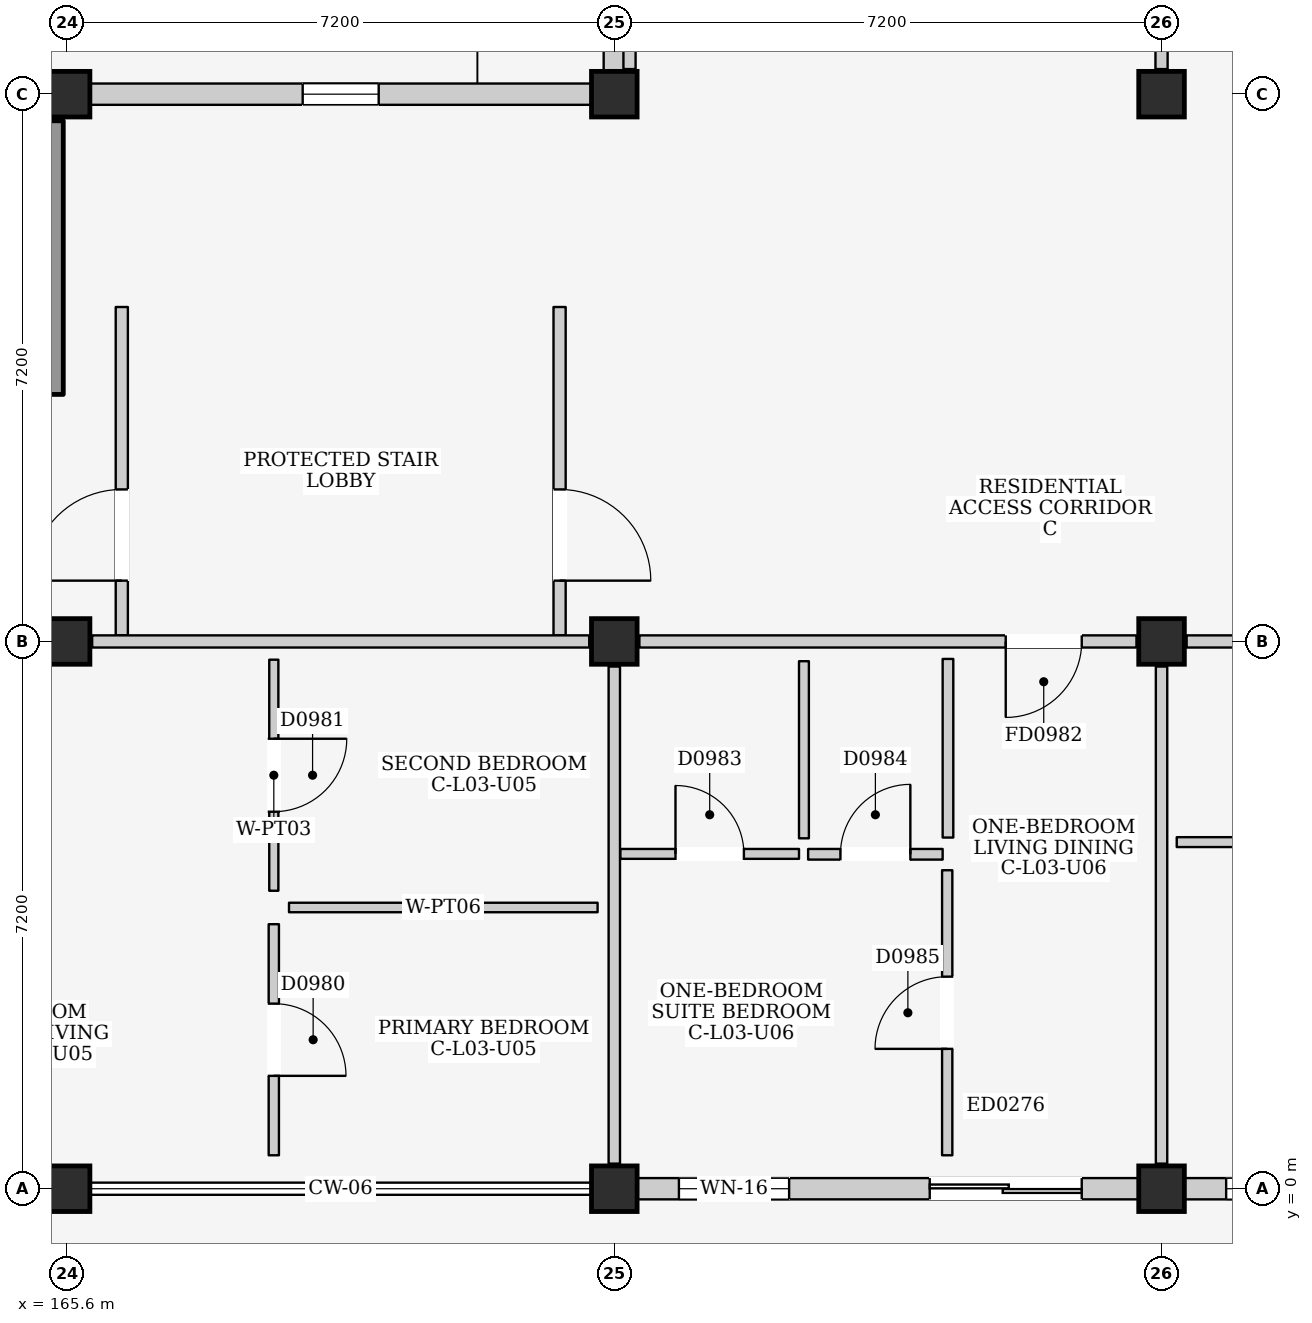
"""IFC4 building model, lengths in metres.
Left out: names, types, materials, properties, quantities, classifications, styles, units other than length and angle.
Written with IfcOpenShell. Run it as: python <this file> out.ifc"""

import sys

from ifc_helpers import new_model, si_unit, direction, frame, frame_2d, origin, origin_2d, place, context, subcontext, project, spatial, rectangle, extrude, element, fill, save


model = new_model("IFC4")
c1 = context("Model", 3, precision=1e-05, world=origin(), true_north=direction((0.0, 1.0)))
c2 = subcontext(c1, "Body", "Model", "MODEL_VIEW")
j1 = project(units=[si_unit("LENGTHUNIT", "METRE"), si_unit("PLANEANGLEUNIT", "RADIAN")], contexts=[c1])
p1 = place(None, origin())
s1 = spatial("IfcSite", under=j1, at=p1, CompositionType="ELEMENT")
p2 = place(p1, origin())
s2 = spatial("IfcBuilding", under=s1, at=p2, CompositionType="ELEMENT")
p3 = place(p2, frame((0.0, 0.0, 12.2)))
s3 = spatial("IfcBuildingStorey", under=s2, at=p3, CompositionType="ELEMENT", Elevation=12.2)
for number, where, z_axis, x_axis in (
    (1, (165.6, 0.0, 0.0), (0.0, 0.0, 1.0), (1.0, 0.0, 0.0)),
    (2, (165.6, 7.2, 0.0), (0.0, 0.0, 1.0), (1.0, 0.0, 0.0)),
    (3, (165.6, 14.4, 0.0), (0.0, 0.0, 1.0), (1.0, 0.0, 0.0)),
    (4, (172.8, 0.0, 0.0), (0.0, 0.0, 1.0), (1.0, 0.0, 0.0)),
    (5, (172.8, 7.2, 0.0), (0.0, 0.0, 1.0), (1.0, 0.0, 0.0)),
    (6, (172.8, 14.4, 0.0), (0.0, 0.0, 1.0), (1.0, 0.0, 0.0)),
    (7, (180.0, 0.0, 0.0), (0.0, 0.0, 1.0), (1.0, 0.0, 0.0)),
    (8, (180.0, 7.2, 0.0), (0.0, 0.0, 1.0), (1.0, 0.0, 0.0)),
    (9, (180.0, 14.4, 0.0), (0.0, 0.0, 1.0), (1.0, 0.0, 0.0)),
):
    element("IfcColumn", number, at=place(p3, frame(where, z_axis=z_axis, x_axis=x_axis)), inside=s3, PredefinedType="COLUMN", context=c2, shape_type="SweptSolid", body=[
        extrude(rectangle(XDim=0.6, YDim=0.6, at=origin_2d()), origin(), (0.0, 0.0, 1.0), 3.2),
    ])
p4 = place(p3, frame((165.9, 14.4, 0.0), z_axis=(0.0, 0.0, 1.0), x_axis=(1.0, 0.0, 0.0)))
e10 = element("IfcWall", 10, at=p4, inside=s3, PredefinedType="ELEMENTEDWALL", context=c2, shape_type="SweptSolid", body=[
    extrude(rectangle(XDim=6.6, YDim=0.28, at=frame_2d((3.3, 0.0))), origin(), (0.0, 0.0, 1.0), 2.365),
])
p5 = place(p4, frame((2.8, 0.0, 1.2)))
e11 = element("IfcOpeningElement", 11, at=p5, cuts=e10, PredefinedType="OPENING", context=c2, shape_type="SweptSolid", body=[
    extrude(rectangle(XDim=1.0, YDim=0.9, at=frame_2d((0.5, 0.45))), frame((0.0, 0.155, 0.0), z_axis=(0.0, -1.0, 0.0), x_axis=(1.0, 0.0, 0.0)), (0.0, 0.0, 1.0), 0.31),
])
p6 = place(p3, frame((173.1, 0.0, 0.0), z_axis=(0.0, 0.0, 1.0), x_axis=(1.0, 0.0, 0.0)))
e12 = element("IfcWall", 12, at=p6, inside=s3, PredefinedType="ELEMENTEDWALL", context=c2, shape_type="SweptSolid", body=[
    extrude(rectangle(XDim=6.6, YDim=0.28, at=frame_2d((3.3, 0.0))), origin(), (0.0, 0.0, 1.0), 2.445),
])
p7 = place(p6, frame((3.85, 0.0, 0.0)))
e13 = element("IfcOpeningElement", 13, at=p7, cuts=e12, PredefinedType="OPENING", context=c2, shape_type="SweptSolid", body=[
    extrude(rectangle(XDim=2.0, YDim=2.12, at=frame_2d((1.0, 1.06))), frame((0.0, 0.155, 0.0), z_axis=(0.0, -1.0, 0.0), x_axis=(1.0, 0.0, 0.0)), (0.0, 0.0, 1.0), 0.31),
])
p8 = place(p6, frame((0.55, 0.0, 0.9)))
e14 = element("IfcOpeningElement", 14, at=p8, cuts=e12, PredefinedType="OPENING", context=c2, shape_type="SweptSolid", body=[
    extrude(rectangle(XDim=1.45, YDim=1.4, at=frame_2d((0.725, 0.7))), frame((0.0, 0.155, 0.0), z_axis=(0.0, -1.0, 0.0), x_axis=(1.0, 0.0, 0.0)), (0.0, 0.0, 1.0), 0.31),
])
p9 = place(p3, frame((172.8, 14.7, 0.0), z_axis=(0.0, 0.0, 1.0), x_axis=(0.0, 1.0, 0.0)))
e15 = element("IfcWall", 15, at=p9, inside=s3, PredefinedType="ELEMENTEDWALL", context=c2, shape_type="SweptSolid", body=[
    extrude(rectangle(XDim=6.6, YDim=0.28, at=frame_2d((3.3, 0.0))), origin(), (0.0, 0.0, 1.0), 2.415),
])
p10 = place(p9, frame((2.5, 0.0, 0.0)))
e16 = element("IfcOpeningElement", 16, at=p10, cuts=e15, PredefinedType="OPENING", context=c2, shape_type="SweptSolid", body=[
    extrude(rectangle(XDim=1.4, YDim=2.1, at=frame_2d((0.7, 1.05))), frame((0.0, 0.155, 0.0), z_axis=(0.0, -1.0, 0.0), x_axis=(1.0, 0.0, 0.0)), (0.0, 0.0, 1.0), 0.31),
])
p11 = place(p3, frame((180.3, 0.0, 0.0), z_axis=(0.0, 0.0, 1.0), x_axis=(1.0, 0.0, 0.0)))
e17 = element("IfcWall", 17, at=p11, inside=s3, PredefinedType="ELEMENTEDWALL", context=c2, shape_type="SweptSolid", body=[
    extrude(rectangle(XDim=6.6, YDim=0.28, at=frame_2d((3.3, 0.0))), origin(), (0.0, 0.0, 1.0), 2.445),
])
p12 = place(p11, frame((3.85, 0.0, 0.0)))
e18 = element("IfcOpeningElement", 18, at=p12, cuts=e17, PredefinedType="OPENING", context=c2, shape_type="SweptSolid", body=[
    extrude(rectangle(XDim=1.4, YDim=2.1, at=frame_2d((0.7, 1.05))), frame((0.0, 0.155, 0.0), z_axis=(0.0, -1.0, 0.0), x_axis=(1.0, 0.0, 0.0)), (0.0, 0.0, 1.0), 0.31),
])
p13 = place(p11, frame((0.55, 0.0, 0.9)))
e19 = element("IfcOpeningElement", 19, at=p13, cuts=e17, PredefinedType="OPENING", context=c2, shape_type="SweptSolid", body=[
    extrude(rectangle(XDim=1.25, YDim=1.3, at=frame_2d((0.625, 0.65))), frame((0.0, 0.155, 0.0), z_axis=(0.0, -1.0, 0.0), x_axis=(1.0, 0.0, 0.0)), (0.0, 0.0, 1.0), 0.31),
])
p14 = place(p3, frame((165.4, 10.45, 0.0), z_axis=(0.0, 0.0, 1.0), x_axis=(0.0, 1.0, 0.0)))
e20 = element("IfcWall", 20, at=p14, inside=s3, PredefinedType="SHEAR", context=c2, shape_type="SweptSolid", body=[
    extrude(rectangle(XDim=3.6, YDim=0.3, at=frame_2d((1.8, 0.0))), origin(), (0.0, 0.0, 1.0), 2.98),
])
p15 = place(p3, frame((166.32, 7.28, 0.0), z_axis=(0.0, 0.0, 1.0), x_axis=(0.0, 1.0, 0.0)))
e21 = element("IfcWall", 21, at=p15, inside=s3, PredefinedType="PARTITIONING", context=c2, shape_type="SweptSolid", body=[
    extrude(rectangle(XDim=4.32, YDim=0.16, at=frame_2d((2.16, 0.0))), origin(), (0.0, 0.0, 1.0), 2.98),
])
p16 = place(p15, frame((0.72, 0.0, 0.0)))
e22 = element("IfcOpeningElement", 22, at=p16, cuts=e21, PredefinedType="OPENING", context=c2, shape_type="SweptSolid", body=[
    extrude(rectangle(XDim=1.2, YDim=2.2, at=frame_2d((0.6, 1.1))), frame((0.0, 0.095, 0.0), z_axis=(0.0, -1.0, 0.0), x_axis=(1.0, 0.0, 0.0)), (0.0, 0.0, 1.0), 0.19),
])
p17 = place(p3, frame((172.08, 7.28, 0.0), z_axis=(0.0, 0.0, 1.0), x_axis=(0.0, 1.0, 0.0)))
e23 = element("IfcWall", 23, at=p17, inside=s3, PredefinedType="PARTITIONING", context=c2, shape_type="SweptSolid", body=[
    extrude(rectangle(XDim=4.32, YDim=0.16, at=frame_2d((2.16, 0.0))), origin(), (0.0, 0.0, 1.0), 2.98),
])
p18 = place(p17, frame((0.72, 0.0, 0.0)))
e24 = element("IfcOpeningElement", 24, at=p18, cuts=e23, PredefinedType="OPENING", context=c2, shape_type="SweptSolid", body=[
    extrude(rectangle(XDim=1.2, YDim=2.2, at=frame_2d((0.6, 1.1))), frame((0.0, 0.095, 0.0), z_axis=(0.0, -1.0, 0.0), x_axis=(1.0, 0.0, 0.0)), (0.0, 0.0, 1.0), 0.19),
])
p19 = place(p3, frame((165.93, 7.2, 0.0), z_axis=(0.0, 0.0, 1.0), x_axis=(1.0, 0.0, 0.0)))
e25 = element("IfcWall", 25, at=p19, inside=s3, PredefinedType="PARTITIONING", context=c2, shape_type="SweptSolid", body=[
    extrude(rectangle(XDim=6.54, YDim=0.16, at=frame_2d((3.27, 0.0))), origin(), (0.0, 0.0, 1.0), 2.365),
])
p20 = place(p3, frame((172.8, 0.33, 0.0), z_axis=(0.0, 0.0, 1.0), x_axis=(0.0, 1.0, 0.0)))
e26 = element("IfcWall", 26, at=p20, inside=s3, PredefinedType="PARTITIONING", context=c2, shape_type="SweptSolid", body=[
    extrude(rectangle(XDim=6.54, YDim=0.15, at=frame_2d((3.27, 0.0))), origin(), (0.0, 0.0, 1.0), 2.415),
])
p21 = place(p3, frame((168.32, 0.44, 0.0), z_axis=(0.0, 0.0, 1.0), x_axis=(0.0, 1.0, 0.0)))
e27 = element("IfcWall", 27, at=p21, inside=s3, PredefinedType="PARTITIONING", context=c2, shape_type="SweptSolid", body=[
    extrude(rectangle(XDim=3.04, YDim=0.135, at=frame_2d((1.52, 0.0))), origin(), (0.0, 0.0, 1.0), 2.98),
])
p22 = place(p21, frame((1.045, 0.0, 0.0)))
e28 = element("IfcOpeningElement", 28, at=p22, cuts=e27, PredefinedType="OPENING", context=c2, shape_type="SweptSolid", body=[
    extrude(rectangle(XDim=0.95, YDim=2.15, at=frame_2d((0.475, 1.075))), frame((0.0, 0.083, 0.0), z_axis=(0.0, -1.0, 0.0), x_axis=(1.0, 0.0, 0.0)), (0.0, 0.0, 1.0), 0.165),
])
p23 = place(p3, frame((168.52, 3.7, 0.0), z_axis=(0.0, 0.0, 1.0), x_axis=(1.0, 0.0, 0.0)))
e29 = element("IfcWall", 29, at=p23, inside=s3, PredefinedType="PARTITIONING", context=c2, shape_type="SweptSolid", body=[
    extrude(rectangle(XDim=4.06, YDim=0.125, at=frame_2d((2.03, 0.0))), origin(), (0.0, 0.0, 1.0), 2.98),
])
p24 = place(p3, frame((168.32, 3.92, 0.0), z_axis=(0.0, 0.0, 1.0), x_axis=(0.0, 1.0, 0.0)))
e30 = element("IfcWall", 30, at=p24, inside=s3, PredefinedType="PARTITIONING", context=c2, shape_type="SweptSolid", body=[
    extrude(rectangle(XDim=3.04, YDim=0.12, at=frame_2d((1.52, 0.0))), origin(), (0.0, 0.0, 1.0), 2.98),
])
p25 = place(p24, frame((1.04, 0.0, 0.0)))
e31 = element("IfcOpeningElement", 31, at=p25, cuts=e30, PredefinedType="OPENING", context=c2, shape_type="SweptSolid", body=[
    extrude(rectangle(XDim=0.96, YDim=2.15, at=frame_2d((0.48, 1.075))), frame((0.0, 0.075, 0.0), z_axis=(0.0, -1.0, 0.0), x_axis=(1.0, 0.0, 0.0)), (0.0, 0.0, 1.0), 0.15),
])
p26 = place(p3, frame((173.13, 7.2, 0.0), z_axis=(0.0, 0.0, 1.0), x_axis=(1.0, 0.0, 0.0)))
e32 = element("IfcWall", 32, at=p26, inside=s3, PredefinedType="PARTITIONING", context=c2, shape_type="SweptSolid", body=[
    extrude(rectangle(XDim=6.54, YDim=0.16, at=frame_2d((3.27, 0.0))), origin(), (0.0, 0.0, 1.0), 2.365),
])
p27 = place(p26, frame((4.82, 0.0, 0.0)))
e33 = element("IfcOpeningElement", 33, at=p27, cuts=e32, PredefinedType="OPENING", context=c2, shape_type="SweptSolid", body=[
    extrude(rectangle(XDim=1.0, YDim=2.15, at=frame_2d((0.5, 1.075))), frame((0.0, 0.095, 0.0), z_axis=(0.0, -1.0, 0.0), x_axis=(1.0, 0.0, 0.0)), (0.0, 0.0, 1.0), 0.19),
])
p28 = place(p3, frame((180.0, 0.33, 0.0), z_axis=(0.0, 0.0, 1.0), x_axis=(0.0, 1.0, 0.0)))
e34 = element("IfcWall", 34, at=p28, inside=s3, PredefinedType="PARTITIONING", context=c2, shape_type="SweptSolid", body=[
    extrude(rectangle(XDim=6.54, YDim=0.15, at=frame_2d((3.27, 0.0))), origin(), (0.0, 0.0, 1.0), 2.415),
])
p29 = place(p3, frame((172.88, 4.405, 0.0), z_axis=(0.0, 0.0, 1.0), x_axis=(1.0, 0.0, 0.0)))
e35 = element("IfcWall", 35, at=p29, inside=s3, PredefinedType="PARTITIONING", context=c2, shape_type="SweptSolid", body=[
    extrude(rectangle(XDim=2.35, YDim=0.13, at=frame_2d((1.175, 0.0))), origin(), (0.0, 0.0, 1.0), 2.98),
])
p30 = place(p29, frame((0.725, 0.0, 0.0)))
e36 = element("IfcOpeningElement", 36, at=p30, cuts=e35, PredefinedType="OPENING", context=c2, shape_type="SweptSolid", body=[
    extrude(rectangle(XDim=0.9, YDim=2.1, at=frame_2d((0.45, 1.05))), frame((0.0, 0.08, 0.0), z_axis=(0.0, -1.0, 0.0), x_axis=(1.0, 0.0, 0.0)), (0.0, 0.0, 1.0), 0.16),
])
p31 = place(p3, frame((175.295, 4.61, 0.0), z_axis=(0.0, 0.0, 1.0), x_axis=(0.0, 1.0, 0.0)))
e37 = element("IfcWall", 37, at=p31, inside=s3, PredefinedType="PARTITIONING", context=c2, shape_type="SweptSolid", body=[
    extrude(rectangle(XDim=2.33, YDim=0.13, at=frame_2d((1.165, 0.0))), origin(), (0.0, 0.0, 1.0), 2.98),
])
p32 = place(p3, frame((175.35, 4.4, 0.0), z_axis=(0.0, 0.0, 1.0), x_axis=(1.0, 0.0, 0.0)))
e38 = element("IfcWall", 38, at=p32, inside=s3, PredefinedType="PARTITIONING", context=c2, shape_type="SweptSolid", body=[
    extrude(rectangle(XDim=1.77, YDim=0.14, at=frame_2d((0.885, 0.0))), origin(), (0.0, 0.0, 1.0), 2.98),
])
p33 = place(p32, frame((0.425, 0.0, 0.0)))
e39 = element("IfcOpeningElement", 39, at=p33, cuts=e38, PredefinedType="OPENING", context=c2, shape_type="SweptSolid", body=[
    extrude(rectangle(XDim=0.92, YDim=2.1, at=frame_2d((0.46, 1.05))), frame((0.0, 0.085, 0.0), z_axis=(0.0, -1.0, 0.0), x_axis=(1.0, 0.0, 0.0)), (0.0, 0.0, 1.0), 0.17),
])
p34 = place(p3, frame((177.19, 4.62, 0.0), z_axis=(0.0, 0.0, 1.0), x_axis=(0.0, 1.0, 0.0)))
e40 = element("IfcWall", 40, at=p34, inside=s3, PredefinedType="PARTITIONING", context=c2, shape_type="SweptSolid", body=[
    extrude(rectangle(XDim=2.35, YDim=0.14, at=frame_2d((1.175, 0.0))), origin(), (0.0, 0.0, 1.0), 2.98),
])
p35 = place(p3, frame((177.18, 0.44, 0.0), z_axis=(0.0, 0.0, 1.0), x_axis=(0.0, 1.0, 0.0)))
e41 = element("IfcWall", 41, at=p35, inside=s3, PredefinedType="PARTITIONING", context=c2, shape_type="SweptSolid", body=[
    extrude(rectangle(XDim=3.75, YDim=0.135, at=frame_2d((1.875, 0.0))), origin(), (0.0, 0.0, 1.0), 2.98),
])
p36 = place(p35, frame((1.4, 0.0, 0.0)))
e42 = element("IfcOpeningElement", 42, at=p36, cuts=e41, PredefinedType="OPENING", context=c2, shape_type="SweptSolid", body=[
    extrude(rectangle(XDim=0.95, YDim=2.15, at=frame_2d((0.475, 1.075))), frame((0.0, 0.083, 0.0), z_axis=(0.0, -1.0, 0.0), x_axis=(1.0, 0.0, 0.0)), (0.0, 0.0, 1.0), 0.165),
])
p37 = place(p3, frame((180.33, 7.2, 0.0), z_axis=(0.0, 0.0, 1.0), x_axis=(1.0, 0.0, 0.0)))
e43 = element("IfcWall", 43, at=p37, inside=s3, PredefinedType="PARTITIONING", context=c2, shape_type="SweptSolid", body=[
    extrude(rectangle(XDim=6.54, YDim=0.16, at=frame_2d((3.27, 0.0))), origin(), (0.0, 0.0, 1.0), 2.365),
])
p38 = place(p37, frame((4.12, 0.0, 0.0)))
e44 = element("IfcOpeningElement", 44, at=p38, cuts=e43, PredefinedType="OPENING", context=c2, shape_type="SweptSolid", body=[
    extrude(rectangle(XDim=1.0, YDim=2.15, at=frame_2d((0.5, 1.075))), frame((0.0, 0.095, 0.0), z_axis=(0.0, -1.0, 0.0), x_axis=(1.0, 0.0, 0.0)), (0.0, 0.0, 1.0), 0.19),
])
p39 = place(p3, frame((180.2, 4.56, 0.0), z_axis=(0.0, 0.0, 1.0), x_axis=(1.0, 0.0, 0.0)))
e45 = element("IfcWall", 45, at=p39, inside=s3, PredefinedType="PARTITIONING", context=c2, shape_type="SweptSolid", body=[
    extrude(rectangle(XDim=2.05, YDim=0.13, at=frame_2d((1.025, 0.0))), origin(), (0.0, 0.0, 1.0), 2.98),
])
p40 = place(p3, frame((180.0, 14.73, 0.0), z_axis=(0.0, 0.0, 1.0), x_axis=(0.0, 1.0, 0.0)))
e46 = element("IfcWall", 46, at=p40, inside=s3, PredefinedType="PARTITIONING", context=c2, shape_type="SweptSolid", body=[
    extrude(rectangle(XDim=6.54, YDim=0.16, at=frame_2d((3.27, 0.0))), origin(), (0.0, 0.0, 1.0), 2.415),
])
p41 = place(p40, frame((3.57, 0.0, 0.0)))
e47 = element("IfcOpeningElement", 47, at=p41, cuts=e46, PredefinedType="OPENING", context=c2, shape_type="SweptSolid", body=[
    extrude(rectangle(XDim=1.0, YDim=2.15, at=frame_2d((0.5, 1.075))), frame((0.0, 0.095, 0.0), z_axis=(0.0, -1.0, 0.0), x_axis=(1.0, 0.0, 0.0)), (0.0, 0.0, 1.0), 0.19),
])
p42 = place(p3, frame((173.0, 14.73, 0.0), z_axis=(0.0, 0.0, 1.0), x_axis=(0.0, 1.0, 0.0)))
e48 = element("IfcWall", 48, at=p42, inside=s3, PredefinedType="PARTITIONING", context=c2, shape_type="SweptSolid", body=[
    extrude(rectangle(XDim=6.54, YDim=0.16, at=frame_2d((3.27, 0.0))), origin(), (0.0, 0.0, 1.0), 2.415),
])
p43 = place(p42, frame((2.76, 0.0, 0.0)))
e49 = element("IfcOpeningElement", 49, at=p43, cuts=e48, PredefinedType="OPENING", context=c2, shape_type="SweptSolid", body=[
    extrude(rectangle(XDim=1.02, YDim=2.18, at=frame_2d((0.51, 1.09))), frame((0.0, 0.095, 0.0), z_axis=(0.0, -1.0, 0.0), x_axis=(1.0, 0.0, 0.0)), (0.0, 0.0, 1.0), 0.19),
])
p44 = place(p5, origin())
e50 = element("IfcWindow", 50, at=p44, inside=s3, PartitioningType="SINGLE_PANEL", PredefinedType="WINDOW", context=c2, shape_type="SweptSolid", body=[
    extrude(rectangle(XDim=1.0, YDim=0.9, at=frame_2d((0.5, 0.45))), frame((0.0, 0.03, 0.0), z_axis=(0.0, -1.0, 0.0), x_axis=(1.0, 0.0, 0.0)), (0.0, 0.0, 1.0), 0.06),
])
fill(e11, e50)
p45 = place(p7, frame((2.0, 0.0, 0.0), z_axis=(0.0, 0.0, 1.0), x_axis=(-1.0, 0.0, 0.0)))
e51 = element("IfcDoor", 51, at=p45, inside=s3, OperationType="DOUBLE_DOOR_SLIDING", PredefinedType="DOOR", context=c2, shape_type="SweptSolid", body=[
    extrude(rectangle(XDim=2.0, YDim=2.12, at=frame_2d((1.0, 1.06))), frame((0.0, 0.025, 0.0), z_axis=(0.0, -1.0, 0.0), x_axis=(1.0, 0.0, 0.0)), (0.0, 0.0, 1.0), 0.05),
])
fill(e13, e51)
p46 = place(p8, origin())
e52 = element("IfcWindow", 52, at=p46, inside=s3, PartitioningType="DOUBLE_PANEL_VERTICAL", PredefinedType="WINDOW", context=c2, shape_type="SweptSolid", body=[
    extrude(rectangle(XDim=1.45, YDim=1.4, at=frame_2d((0.725, 0.7))), frame((0.0, 0.03, 0.0), z_axis=(0.0, -1.0, 0.0), x_axis=(1.0, 0.0, 0.0)), (0.0, 0.0, 1.0), 0.06),
])
fill(e14, e52)
p47 = place(p13, origin())
e53 = element("IfcWindow", 53, at=p47, inside=s3, PartitioningType="SINGLE_PANEL", PredefinedType="WINDOW", context=c2, shape_type="SweptSolid", body=[
    extrude(rectangle(XDim=1.25, YDim=1.3, at=frame_2d((0.625, 0.65))), frame((0.0, 0.03, 0.0), z_axis=(0.0, -1.0, 0.0), x_axis=(1.0, 0.0, 0.0)), (0.0, 0.0, 1.0), 0.06),
])
fill(e19, e53)
p48 = place(p16, origin())
e54 = element("IfcDoor", 54, at=p48, inside=s3, OperationType="SINGLE_SWING_LEFT", PredefinedType="DOOR", context=c2, shape_type="SweptSolid", body=[
    extrude(rectangle(XDim=1.2, YDim=2.2, at=frame_2d((0.6, 1.1))), frame((0.0, 0.025, 0.0), z_axis=(0.0, -1.0, 0.0), x_axis=(1.0, 0.0, 0.0)), (0.0, 0.0, 1.0), 0.05),
])
fill(e22, e54)
p49 = place(p18, frame((1.2, 0.0, 0.0), z_axis=(0.0, 0.0, 1.0), x_axis=(-1.0, 0.0, 0.0)))
e55 = element("IfcDoor", 55, at=p49, inside=s3, OperationType="SINGLE_SWING_RIGHT", PredefinedType="DOOR", context=c2, shape_type="SweptSolid", body=[
    extrude(rectangle(XDim=1.2, YDim=2.2, at=frame_2d((0.6, 1.1))), frame((0.0, 0.025, 0.0), z_axis=(0.0, -1.0, 0.0), x_axis=(1.0, 0.0, 0.0)), (0.0, 0.0, 1.0), 0.05),
])
fill(e24, e55)
p50 = place(p22, frame((0.95, 0.0, 0.0), z_axis=(0.0, 0.0, 1.0), x_axis=(-1.0, 0.0, 0.0)))
e56 = element("IfcDoor", 56, at=p50, inside=s3, OperationType="SINGLE_SWING_RIGHT", PredefinedType="DOOR", context=c2, shape_type="SweptSolid", body=[
    extrude(rectangle(XDim=0.95, YDim=2.15, at=frame_2d((0.475, 1.075))), frame((0.0, 0.025, 0.0), z_axis=(0.0, -1.0, 0.0), x_axis=(1.0, 0.0, 0.0)), (0.0, 0.0, 1.0), 0.05),
])
fill(e28, e56)
p51 = place(p25, frame((0.96, 0.0, 0.0), z_axis=(0.0, 0.0, 1.0), x_axis=(-1.0, 0.0, 0.0)))
e57 = element("IfcDoor", 57, at=p51, inside=s3, OperationType="SINGLE_SWING_LEFT", PredefinedType="DOOR", context=c2, shape_type="SweptSolid", body=[
    extrude(rectangle(XDim=0.96, YDim=2.15, at=frame_2d((0.48, 1.075))), frame((0.0, 0.025, 0.0), z_axis=(0.0, -1.0, 0.0), x_axis=(1.0, 0.0, 0.0)), (0.0, 0.0, 1.0), 0.05),
])
fill(e31, e57)
p52 = place(p27, frame((1.0, 0.0, 0.0), z_axis=(0.0, 0.0, 1.0), x_axis=(-1.0, 0.0, 0.0)))
e58 = element("IfcDoor", 58, at=p52, inside=s3, OperationType="SINGLE_SWING_RIGHT", PredefinedType="DOOR", context=c2, shape_type="SweptSolid", body=[
    extrude(rectangle(XDim=1.0, YDim=2.15, at=frame_2d((0.5, 1.075))), frame((0.0, 0.025, 0.0), z_axis=(0.0, -1.0, 0.0), x_axis=(1.0, 0.0, 0.0)), (0.0, 0.0, 1.0), 0.05),
])
fill(e33, e58)
p53 = place(p30, origin())
e59 = element("IfcDoor", 59, at=p53, inside=s3, OperationType="SINGLE_SWING_LEFT", PredefinedType="DOOR", context=c2, shape_type="SweptSolid", body=[
    extrude(rectangle(XDim=0.9, YDim=2.1, at=frame_2d((0.45, 1.05))), frame((0.0, 0.025, 0.0), z_axis=(0.0, -1.0, 0.0), x_axis=(1.0, 0.0, 0.0)), (0.0, 0.0, 1.0), 0.05),
])
fill(e36, e59)
p54 = place(p33, origin())
e60 = element("IfcDoor", 60, at=p54, inside=s3, OperationType="SINGLE_SWING_RIGHT", PredefinedType="DOOR", context=c2, shape_type="SweptSolid", body=[
    extrude(rectangle(XDim=0.92, YDim=2.1, at=frame_2d((0.46, 1.05))), frame((0.0, 0.025, 0.0), z_axis=(0.0, -1.0, 0.0), x_axis=(1.0, 0.0, 0.0)), (0.0, 0.0, 1.0), 0.05),
])
fill(e39, e60)
p55 = place(p36, origin())
e61 = element("IfcDoor", 61, at=p55, inside=s3, OperationType="SINGLE_SWING_LEFT", PredefinedType="DOOR", context=c2, shape_type="SweptSolid", body=[
    extrude(rectangle(XDim=0.95, YDim=2.15, at=frame_2d((0.475, 1.075))), frame((0.0, 0.025, 0.0), z_axis=(0.0, -1.0, 0.0), x_axis=(1.0, 0.0, 0.0)), (0.0, 0.0, 1.0), 0.05),
])
fill(e42, e61)
save(model, sys.argv[1])
